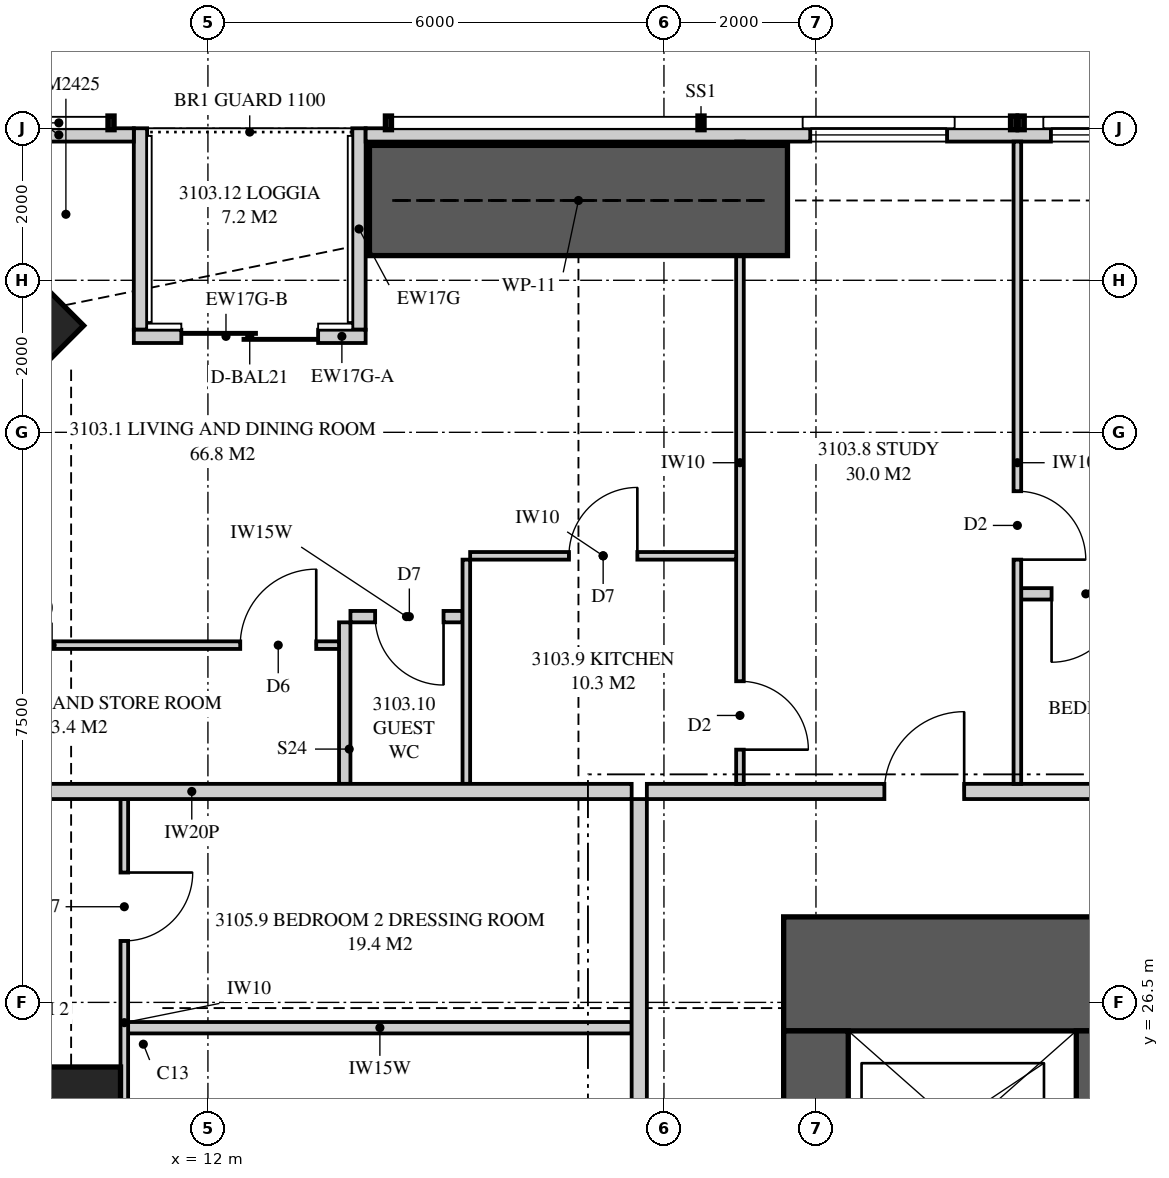
"""IFC4 building model, lengths in metres.
Left out: names, types, materials, properties, quantities, classifications, styles, units other than length and angle.
Written with IfcOpenShell. Run it as: python <this file> out.ifc"""

import sys

from ifc_helpers import new_model, si_unit, direction, frame, frame_2d, origin, origin_2d, place, context, subcontext, project, spatial, polyline, rectangle, outline, extrude, element, fill, save


model = new_model("IFC4")
c1 = context("Model", 3, precision=1e-05, world=origin(), true_north=direction((0.0, 1.0)))
c2 = subcontext(c1, "Body", "Model", "MODEL_VIEW")
j1 = project(units=[si_unit("LENGTHUNIT", "METRE"), si_unit("PLANEANGLEUNIT", "RADIAN")], contexts=[c1])
p1 = place(None, origin())
s1 = spatial("IfcSite", under=j1, at=p1, CompositionType="ELEMENT")
p2 = place(p1, origin())
s2 = spatial("IfcBuilding", under=s1, at=p2, CompositionType="ELEMENT")
p3 = place(p2, frame((0.0, 0.0, 114.9)))
s3 = spatial("IfcBuildingStorey", under=s2, at=p3, CompositionType="ELEMENT", Elevation=114.9)
p4 = place(p3, frame((8.631, 35.369, 0.0), z_axis=(0.0, 0.0, 1.0), x_axis=(0.707106781187, -0.707106781187, 0.0)))
e1 = element("IfcColumn", 1, at=p4, inside=s3, PredefinedType="COLUMN", context=c2, shape_type="SweptSolid", body=[
    extrude(rectangle(XDim=2.4, YDim=2.5, at=origin_2d()), origin(), (0.0, 0.0, 1.0), 3.35),
])
p5 = place(p3, frame((10.2, 25.0, 0.0), z_axis=(0.0, 0.0, 1.0), x_axis=(1.0, 0.0, 0.0)))
e2 = element("IfcColumn", 2, at=p5, inside=s3, PredefinedType="COLUMN", context=c2, shape_type="SweptSolid", body=[
    extrude(rectangle(XDim=1.3, YDim=1.3, at=origin_2d()), origin(), (0.0, 0.0, 1.0), 3.35),
])
p6 = place(p3, frame((26.0, 26.875, 0.0), z_axis=(0.0, 0.0, 1.0), x_axis=(-1.0, 0.0, 0.0)))
e3 = element("IfcWall", 3, at=p6, inside=s3, PredefinedType="SHEAR", context=c2, shape_type="SweptSolid", body=[
    extrude(rectangle(XDim=6.425, YDim=1.5, at=frame_2d((3.212, 0.0))), origin(), (0.0, 0.0, 1.0), 3.35),
])
p7 = place(p6, frame((0.825, 0.0, 0.0)))
e4 = element("IfcOpeningElement", 4, at=p7, cuts=e3, PredefinedType="OPENING", context=c2, shape_type="SweptSolid", body=[
    extrude(rectangle(XDim=0.75, YDim=2.1, at=frame_2d((0.375, 1.05))), frame((0.0, 0.76, 0.0), z_axis=(0.0, -1.0, 0.0), x_axis=(1.0, 0.0, 0.0)), (0.0, 0.0, 1.0), 1.52),
])
p8 = place(p3, frame((20.0, 26.125, 0.0), z_axis=(0.0, 0.0, 1.0), x_axis=(0.0, -1.0, 0.0)))
e5 = element("IfcWall", 5, at=p8, inside=s3, PredefinedType="SHEAR", context=c2, shape_type="SweptSolid", body=[
    extrude(rectangle(XDim=2.825, YDim=0.85, at=frame_2d((1.413, 0.0))), origin(), (0.0, 0.0, 1.0), 3.35),
])
p9 = place(p3, frame((23.6, 23.3, 0.0), z_axis=(0.0, 0.0, 1.0), x_axis=(0.0, 1.0, 0.0)))
e6 = element("IfcWall", 6, at=p9, inside=s3, PredefinedType="SHEAR", context=c2, shape_type="SweptSolid", body=[
    extrude(rectangle(XDim=2.825, YDim=0.35, at=frame_2d((1.413, 0.0))), origin(), (0.0, 0.0, 1.0), 3.35),
])
p10 = place(p3, frame((41.449, 37.913, 0.0), z_axis=(0.0, 0.0, 1.0), x_axis=(-1.0, 0.0, 0.0)))
e7 = element("IfcWall", 7, at=p10, inside=s3, PredefinedType="SOLIDWALL", context=c2, shape_type="SweptSolid", body=[
    extrude(outline(polyline([(0.0, 0.0), (27.374, 0.0), (27.374, 3.11), (24.777, 3.11), (24.777, 2.15), (24.732, 2.15), (24.732, 3.11), (24.574, 3.11), (24.574, 2.15), (2.824, 2.15), (2.824, 3.11), (2.666, 3.11), (2.666, 2.15), (2.62, 2.15), (2.62, 3.11), (0.0, 3.11), (0.0, 0.0)])), frame((0.0, 0.087, 0.0), z_axis=(0.0, -1.0, 0.0), x_axis=(1.0, 0.0, 0.0)), (0.0, 0.0, 1.0), 0.175),
])
p11 = place(p10, frame((5.699, 0.0, 0.4)))
e8 = element("IfcOpeningElement", 8, at=p11, cuts=e7, PredefinedType="OPENING", context=c2, shape_type="SweptSolid", body=[
    extrude(rectangle(XDim=1.8, YDim=1.7, at=frame_2d((0.9, 0.85))), frame((0.0, 0.097, 0.0), z_axis=(0.0, -1.0, 0.0), x_axis=(1.0, 0.0, 0.0)), (0.0, 0.0, 1.0), 0.195),
])
p12 = place(p10, frame((9.034, 0.0, 0.4)))
e9 = element("IfcOpeningElement", 9, at=p12, cuts=e7, PredefinedType="OPENING", context=c2, shape_type="SweptSolid", body=[
    extrude(rectangle(XDim=1.8, YDim=1.7, at=frame_2d((0.9, 0.85))), frame((0.0, 0.097, 0.0), z_axis=(0.0, -1.0, 0.0), x_axis=(1.0, 0.0, 0.0)), (0.0, 0.0, 1.0), 0.195),
])
p13 = place(p10, frame((16.558, 0.0, 0.4)))
e10 = element("IfcOpeningElement", 10, at=p13, cuts=e7, PredefinedType="OPENING", context=c2, shape_type="SweptSolid", body=[
    extrude(rectangle(XDim=1.8, YDim=1.7, at=frame_2d((0.9, 0.85))), frame((0.0, 0.097, 0.0), z_axis=(0.0, -1.0, 0.0), x_axis=(1.0, 0.0, 0.0)), (0.0, 0.0, 1.0), 0.195),
])
p14 = place(p10, frame((19.724, 0.0, 0.4)))
e11 = element("IfcOpeningElement", 11, at=p14, cuts=e7, PredefinedType="OPENING", context=c2, shape_type="SweptSolid", body=[
    extrude(rectangle(XDim=1.8, YDim=1.7, at=frame_2d((0.9, 0.85))), frame((0.0, 0.097, 0.0), z_axis=(0.0, -1.0, 0.0), x_axis=(1.0, 0.0, 0.0)), (0.0, 0.0, 1.0), 0.195),
])
p15 = place(p3, frame((11.025, 37.913, 0.0), z_axis=(0.0, 0.0, 1.0), x_axis=(-1.0, 0.0, 0.0)))
e12 = element("IfcWall", 12, at=p15, inside=s3, PredefinedType="SOLIDWALL", context=c2, shape_type="SweptSolid", body=[
    extrude(rectangle(XDim=1.974, YDim=0.175, at=frame_2d((0.987, 0.0))), origin(), (0.0, 0.0, 1.0), 3.11),
])
p16 = place(p3, frame((14.075, 35.262, 0.0), z_axis=(0.0, 0.0, 1.0), x_axis=(-1.0, 0.0, 0.0)))
e13 = element("IfcWall", 13, at=p16, inside=s3, PredefinedType="SOLIDWALL", context=c2, shape_type="SweptSolid", body=[
    extrude(rectangle(XDim=0.625, YDim=0.175, at=frame_2d((0.312, 0.0))), origin(), (0.0, 0.0, 1.0), 3.11),
])
p17 = place(p3, frame((13.45, 35.262, 0.0), z_axis=(0.0, 0.0, 1.0), x_axis=(-1.0, 0.0, 0.0)))
e14 = element("IfcWall", 14, at=p17, inside=s3, PredefinedType="SOLIDWALL", context=c2, shape_type="SweptSolid", body=[
    extrude(rectangle(XDim=2.425, YDim=0.175, at=frame_2d((1.212, 0.0))), origin(), (0.0, 0.0, 1.0), 2.15),
])
p18 = place(p17, origin())
e15 = element("IfcOpeningElement", 15, at=p18, cuts=e14, PredefinedType="OPENING", context=c2, shape_type="SweptSolid", body=[
    extrude(rectangle(XDim=1.8, YDim=2.1, at=frame_2d((0.9, 1.05))), frame((0.0, 0.097, 0.0), z_axis=(0.0, -1.0, 0.0), x_axis=(1.0, 0.0, 0.0)), (0.0, 0.0, 1.0), 0.195),
])
p19 = place(p3, frame((13.988, 38.0, 0.0), z_axis=(0.0, 0.0, 1.0), x_axis=(0.0, -1.0, 0.0)))
e16 = element("IfcWall", 16, at=p19, inside=s3, PredefinedType="SOLIDWALL", context=c2, shape_type="SweptSolid", body=[
    extrude(outline(polyline([(0.0, 0.0), (2.65, 0.0), (2.65, 3.11), (2.373, 3.11), (2.373, 2.15), (0.705, 2.15), (0.705, 3.11), (0.0, 3.11), (0.0, 0.0)])), frame((0.0, 0.087, 0.0), z_axis=(0.0, -1.0, 0.0), x_axis=(1.0, 0.0, 0.0)), (0.0, 0.0, 1.0), 0.175),
])
p20 = place(p3, frame((11.113, 38.0, 0.0), z_axis=(0.0, 0.0, 1.0), x_axis=(0.0, -1.0, 0.0)))
e17 = element("IfcWall", 17, at=p20, inside=s3, PredefinedType="SOLIDWALL", context=c2, shape_type="SweptSolid", body=[
    extrude(outline(polyline([(0.0, 0.0), (2.65, 0.0), (2.65, 2.15), (1.291, 2.15), (1.291, 3.11), (0.0, 3.11), (0.0, 0.0)])), frame((0.0, 0.087, 0.0), z_axis=(0.0, -1.0, 0.0), x_axis=(1.0, 0.0, 0.0)), (0.0, 0.0, 1.0), 0.175),
])
p21 = place(p3, frame((17.775, 29.275, 0.0), z_axis=(0.0, 0.0, 1.0), x_axis=(1.0, 0.0, 0.0)))
e18 = element("IfcWall", 18, at=p21, inside=s3, PredefinedType="PARTITIONING", context=c2, shape_type="SweptSolid", body=[
    extrude(outline(polyline([(0.0, 0.0), (18.925, 0.0), (18.925, 3.11), (10.312, 3.11), (10.312, 2.541), (9.638, 2.541), (9.638, 3.11), (0.0, 3.11), (0.0, 0.0)])), frame((0.0, 0.1, 0.0), z_axis=(0.0, -1.0, 0.0), x_axis=(1.0, 0.0, 0.0)), (0.0, 0.0, 1.0), 0.2),
])
p22 = place(p21, frame((3.125, 0.0, 0.0)))
e19 = element("IfcOpeningElement", 19, at=p22, cuts=e18, PredefinedType="OPENING", context=c2, shape_type="SweptSolid", body=[
    extrude(rectangle(XDim=1.05, YDim=2.2, at=frame_2d((0.525, 1.1))), frame((0.0, 0.11, 0.0), z_axis=(0.0, -1.0, 0.0), x_axis=(1.0, 0.0, 0.0)), (0.0, 0.0, 1.0), 0.22),
])
p23 = place(p3, frame((22.65, 37.825, 0.0), z_axis=(0.0, 0.0, 1.0), x_axis=(0.0, -1.0, 0.0)))
e20 = element("IfcWall", 20, at=p23, inside=s3, PredefinedType="PARTITIONING", context=c2, shape_type="SweptSolid", body=[
    extrude(outline(polyline([(0.0, 0.0), (8.45, 0.0), (8.45, 3.11), (1.635, 3.11), (1.635, 2.15), (0.0, 2.15), (0.0, 3.11), (0.0, 0.0)])), frame((0.0, 0.05, 0.0), z_axis=(0.0, -1.0, 0.0), x_axis=(1.0, 0.0, 0.0)), (0.0, 0.0, 1.0), 0.1),
])
p24 = place(p23, frame((4.6, 0.0, 0.0)))
e21 = element("IfcOpeningElement", 21, at=p24, cuts=e20, PredefinedType="OPENING", context=c2, shape_type="SweptSolid", body=[
    extrude(rectangle(XDim=0.9, YDim=2.1, at=frame_2d((0.45, 1.05))), frame((0.0, 0.06, 0.0), z_axis=(0.0, -1.0, 0.0), x_axis=(1.0, 0.0, 0.0)), (0.0, 0.0, 1.0), 0.12),
])
p25 = place(p3, frame((22.7, 31.875, 0.0), z_axis=(0.0, 0.0, 1.0), x_axis=(1.0, 0.0, 0.0)))
e22 = element("IfcWall", 22, at=p25, inside=s3, PredefinedType="PLUMBINGWALL", context=c2, shape_type="SweptSolid", body=[
    extrude(rectangle(XDim=4.15, YDim=0.15, at=frame_2d((2.075, 0.0))), origin(), (0.0, 0.0, 1.0), 3.11),
])
p26 = place(p25, frame((0.4, 0.0, 0.0)))
e23 = element("IfcOpeningElement", 23, at=p26, cuts=e22, PredefinedType="OPENING", context=c2, shape_type="SweptSolid", body=[
    extrude(rectangle(XDim=0.9, YDim=2.1, at=frame_2d((0.45, 1.05))), frame((0.0, 0.085, 0.0), z_axis=(0.0, -1.0, 0.0), x_axis=(1.0, 0.0, 0.0)), (0.0, 0.0, 1.0), 0.17),
])
p27 = place(p3, frame((19.0, 37.825, 0.0), z_axis=(0.0, 0.0, 1.0), x_axis=(0.0, -1.0, 0.0)))
e24 = element("IfcWall", 24, at=p27, inside=s3, PredefinedType="PARTITIONING", context=c2, shape_type="SweptSolid", body=[
    extrude(outline(polyline([(0.529, 2.15), (0.0, 2.15), (0.0, 0.0), (0.529, 0.0), (0.529, 0.017), (1.021, 0.017), (1.021, 0.0), (8.45, 0.0), (8.45, 3.11), (1.635, 3.11), (1.635, 2.15), (1.021, 2.15), (1.021, 2.133), (0.529, 2.133), (0.529, 2.15)])), frame((0.0, 0.05, 0.0), z_axis=(0.0, -1.0, 0.0), x_axis=(1.0, 0.0, 0.0)), (0.0, 0.0, 1.0), 0.1),
])
p28 = place(p27, frame((7.1, 0.0, 0.0)))
e25 = element("IfcOpeningElement", 25, at=p28, cuts=e24, PredefinedType="OPENING", context=c2, shape_type="SweptSolid", body=[
    extrude(rectangle(XDim=0.9, YDim=2.1, at=frame_2d((0.45, 1.05))), frame((0.0, 0.06, 0.0), z_axis=(0.0, -1.0, 0.0), x_axis=(1.0, 0.0, 0.0)), (0.0, 0.0, 1.0), 0.12),
])
p29 = place(p3, frame((15.45, 32.375, 0.0), z_axis=(0.0, 0.0, 1.0), x_axis=(1.0, 0.0, 0.0)))
e26 = element("IfcWall", 26, at=p29, inside=s3, PredefinedType="PARTITIONING", context=c2, shape_type="SweptSolid", body=[
    extrude(outline(polyline([(0.0, 0.0), (3.5, 0.0), (3.5, 3.11), (1.712, 3.11), (1.712, 2.541), (1.138, 2.541), (1.138, 3.11), (0.0, 3.11), (0.0, 0.0)])), frame((0.0, 0.05, 0.0), z_axis=(0.0, -1.0, 0.0), x_axis=(1.0, 0.0, 0.0)), (0.0, 0.0, 1.0), 0.1),
])
p30 = place(p29, frame((1.3, 0.0, 0.0)))
e27 = element("IfcOpeningElement", 27, at=p30, cuts=e26, PredefinedType="OPENING", context=c2, shape_type="SweptSolid", body=[
    extrude(rectangle(XDim=0.9, YDim=2.1, at=frame_2d((0.45, 1.05))), frame((0.0, 0.06, 0.0), z_axis=(0.0, -1.0, 0.0), x_axis=(1.0, 0.0, 0.0)), (0.0, 0.0, 1.0), 0.12),
])
p31 = place(p3, frame((15.4, 32.325, 0.0), z_axis=(0.0, 0.0, 1.0), x_axis=(0.0, -1.0, 0.0)))
e28 = element("IfcWall", 28, at=p31, inside=s3, PredefinedType="PARTITIONING", context=c2, shape_type="SweptSolid", body=[
    extrude(rectangle(XDim=2.95, YDim=0.1, at=frame_2d((1.475, 0.0))), origin(), (0.0, 0.0, 1.0), 3.11),
])
p32 = place(p3, frame((13.875, 31.575, 0.0), z_axis=(0.0, 0.0, 1.0), x_axis=(1.0, 0.0, 0.0)))
e29 = element("IfcWall", 29, at=p32, inside=s3, PredefinedType="PLUMBINGWALL", context=c2, shape_type="SweptSolid", body=[
    extrude(rectangle(XDim=1.475, YDim=0.15, at=frame_2d((0.738, 0.0))), origin(), (0.0, 0.0, 1.0), 3.11),
])
p33 = place(p32, frame((0.325, 0.0, 0.0)))
e30 = element("IfcOpeningElement", 30, at=p33, cuts=e29, PredefinedType="OPENING", context=c2, shape_type="SweptSolid", body=[
    extrude(rectangle(XDim=0.9, YDim=2.1, at=frame_2d((0.45, 1.05))), frame((0.0, 0.085, 0.0), z_axis=(0.0, -1.0, 0.0), x_axis=(1.0, 0.0, 0.0)), (0.0, 0.0, 1.0), 0.17),
])
p34 = place(p3, frame((13.8, 31.5, 0.0), z_axis=(0.0, 0.0, 1.0), x_axis=(0.0, -1.0, 0.0)))
e31 = element("IfcWall", 31, at=p34, inside=s3, PredefinedType="PLUMBINGWALL", context=c2, shape_type="SweptSolid", body=[
    extrude(rectangle(XDim=2.125, YDim=0.15, at=frame_2d((1.062, 0.0))), origin(), (0.0, 0.0, 1.0), 3.11),
])
p35 = place(p3, frame((6.175, 31.2, 0.0), z_axis=(0.0, 0.0, 1.0), x_axis=(1.0, 0.0, 0.0)))
e32 = element("IfcWall", 32, at=p35, inside=s3, PredefinedType="PARTITIONING", context=c2, shape_type="SweptSolid", body=[
    extrude(outline(polyline([(0.0, 0.0), (7.55, 0.0), (7.55, 3.11), (5.285, 3.11), (5.285, 2.51), (2.765, 2.51), (2.765, 3.11), (2.744, 3.11), (2.744, 2.541), (2.652, 2.541), (2.652, 2.15), (0.909, 2.15), (0.909, 3.11), (0.0, 3.11), (0.0, 0.0)])), frame((0.0, 0.05, 0.0), z_axis=(0.0, -1.0, 0.0), x_axis=(1.0, 0.0, 0.0)), (0.0, 0.0, 1.0), 0.1),
])
p36 = place(p35, frame((6.25, 0.0, 0.0)))
e33 = element("IfcOpeningElement", 33, at=p36, cuts=e32, PredefinedType="OPENING", context=c2, shape_type="SweptSolid", body=[
    extrude(rectangle(XDim=1.0, YDim=2.1, at=frame_2d((0.5, 1.05))), frame((0.0, 0.06, 0.0), z_axis=(0.0, -1.0, 0.0), x_axis=(1.0, 0.0, 0.0)), (0.0, 0.0, 1.0), 0.12),
])
p37 = place(p3, frame((6.0, 29.275, 0.0), z_axis=(0.0, 0.0, 1.0), x_axis=(1.0, 0.0, 0.0)))
e34 = element("IfcWall", 34, at=p37, inside=s3, PredefinedType="PARTITIONING", context=c2, shape_type="SweptSolid", body=[
    extrude(outline(polyline([(0.0, 0.0), (11.575, 0.0), (11.575, 3.11), (11.212, 3.11), (11.212, 2.541), (10.538, 2.541), (10.538, 3.11), (5.51, 3.11), (5.51, 2.51), (2.969, 2.51), (2.969, 2.541), (2.565, 2.541), (2.565, 2.15), (0.721, 2.15), (0.721, 3.11), (0.0, 3.11), (0.0, 0.0)])), frame((0.0, 0.1, 0.0), z_axis=(0.0, -1.0, 0.0), x_axis=(1.0, 0.0, 0.0)), (0.0, 0.0, 1.0), 0.2),
])
p38 = place(p3, frame((17.675, 19.7, 0.0), z_axis=(0.0, 0.0, 1.0), x_axis=(0.0, 1.0, 0.0)))
e35 = element("IfcWall", 35, at=p38, inside=s3, PredefinedType="PARTITIONING", context=c2, shape_type="SweptSolid", body=[
    extrude(outline(polyline([(0.0, 0.0), (9.475, 0.0), (9.475, 3.11), (7.062, 3.11), (7.062, 2.541), (6.388, 2.541), (6.388, 3.11), (0.0, 3.11), (0.0, 0.0)])), frame((0.0, 0.1, 0.0), z_axis=(0.0, -1.0, 0.0), x_axis=(1.0, 0.0, 0.0)), (0.0, 0.0, 1.0), 0.2),
])
p39 = place(p3, frame((10.9, 23.292, 0.0), z_axis=(0.0, 0.0, 1.0), x_axis=(0.0, 1.0, 0.0)))
e36 = element("IfcWall", 36, at=p39, inside=s3, PredefinedType="PARTITIONING", context=c2, shape_type="SweptSolid", body=[
    extrude(outline(polyline([(0.0, 0.0), (5.883, 0.0), (5.883, 3.11), (5.883, 2.51), (1.768, 2.51), (0.0, 2.51), (0.0, 3.11), (0.0, 0.0)])), frame((0.0, 0.05, 0.0), z_axis=(0.0, -1.0, 0.0), x_axis=(1.0, 0.0, 0.0)), (0.0, 0.0, 1.0), 0.1),
])
p40 = place(p39, frame((0.15, 0.0, 0.0)))
e37 = element("IfcOpeningElement", 37, at=p40, cuts=e36, PredefinedType="OPENING", context=c2, shape_type="SweptSolid", body=[
    extrude(rectangle(XDim=0.9, YDim=2.1, at=frame_2d((0.45, 1.05))), frame((0.0, 0.06, 0.0), z_axis=(0.0, -1.0, 0.0), x_axis=(1.0, 0.0, 0.0)), (0.0, 0.0, 1.0), 0.12),
])
p41 = place(p39, frame((4.017, 0.0, 0.0)))
e38 = element("IfcOpeningElement", 38, at=p41, cuts=e36, PredefinedType="OPENING", context=c2, shape_type="SweptSolid", body=[
    extrude(rectangle(XDim=0.9, YDim=2.1, at=frame_2d((0.45, 1.05))), frame((0.0, 0.06, 0.0), z_axis=(0.0, -1.0, 0.0), x_axis=(1.0, 0.0, 0.0)), (0.0, 0.0, 1.0), 0.12),
])
p42 = place(p3, frame((10.95, 26.167, 0.0), z_axis=(0.0, 0.0, 1.0), x_axis=(1.0, 0.0, 0.0)))
e39 = element("IfcWall", 39, at=p42, inside=s3, PredefinedType="PLUMBINGWALL", context=c2, shape_type="SweptSolid", body=[
    extrude(outline(polyline([(0.0, 0.0), (6.625, 0.0), (6.625, 3.11), (6.625, 2.541), (0.535, 2.541), (0.535, 2.51), (0.0, 2.51), (0.0, 3.11), (0.0, 0.0)])), frame((0.0, 0.075, 0.0), z_axis=(0.0, -1.0, 0.0), x_axis=(1.0, 0.0, 0.0)), (0.0, 0.0, 1.0), 0.15),
])
p43 = place(p3, frame((14.125, 37.05, 0.0), z_axis=(0.0, 0.0, 1.0), x_axis=(1.0, 0.0, 0.0)))
e40 = element("IfcWall", 40, at=p43, inside=s3, PredefinedType="SHEAR", context=c2, shape_type="SweptSolid", body=[
    extrude(rectangle(XDim=5.5, YDim=1.45, at=frame_2d((2.75, 0.0))), origin(), (0.0, 0.0, 1.0), 3.35),
])
p44 = place(p13, origin())
e41 = element("IfcWindow", 41, at=p44, inside=s3, PartitioningType="SINGLE_PANEL", PredefinedType="WINDOW", context=c2, shape_type="SweptSolid", body=[
    extrude(rectangle(XDim=1.8, YDim=1.7, at=frame_2d((0.9, 0.85))), frame((0.0, 0.03, 0.0), z_axis=(0.0, -1.0, 0.0), x_axis=(1.0, 0.0, 0.0)), (0.0, 0.0, 1.0), 0.06),
])
fill(e10, e41)
p45 = place(p14, origin())
e42 = element("IfcWindow", 42, at=p45, inside=s3, PartitioningType="SINGLE_PANEL", PredefinedType="WINDOW", context=c2, shape_type="SweptSolid", body=[
    extrude(rectangle(XDim=1.8, YDim=1.7, at=frame_2d((0.9, 0.85))), frame((0.0, 0.03, 0.0), z_axis=(0.0, -1.0, 0.0), x_axis=(1.0, 0.0, 0.0)), (0.0, 0.0, 1.0), 0.06),
])
fill(e11, e42)
p46 = place(p18, origin())
e43 = element("IfcDoor", 43, at=p46, inside=s3, OperationType="SLIDING_TO_LEFT", PredefinedType="DOOR", context=c2, shape_type="SweptSolid", body=[
    extrude(rectangle(XDim=1.8, YDim=2.1, at=frame_2d((0.9, 1.05))), frame((0.0, 0.025, 0.0), z_axis=(0.0, -1.0, 0.0), x_axis=(1.0, 0.0, 0.0)), (0.0, 0.0, 1.0), 0.05),
])
fill(e15, e43)
p47 = place(p22, origin())
e44 = element("IfcDoor", 44, at=p47, inside=s3, OperationType="SINGLE_SWING_RIGHT", PredefinedType="DOOR", context=c2, shape_type="SweptSolid", body=[
    extrude(rectangle(XDim=1.05, YDim=2.2, at=frame_2d((0.525, 1.1))), frame((0.0, 0.025, 0.0), z_axis=(0.0, -1.0, 0.0), x_axis=(1.0, 0.0, 0.0)), (0.0, 0.0, 1.0), 0.05),
])
fill(e19, e44)
p48 = place(p24, origin())
e45 = element("IfcDoor", 45, at=p48, inside=s3, OperationType="SINGLE_SWING_RIGHT", PredefinedType="DOOR", context=c2, shape_type="SweptSolid", body=[
    extrude(rectangle(XDim=0.9, YDim=2.1, at=frame_2d((0.45, 1.05))), frame((0.0, 0.025, 0.0), z_axis=(0.0, -1.0, 0.0), x_axis=(1.0, 0.0, 0.0)), (0.0, 0.0, 1.0), 0.05),
])
fill(e21, e45)
p49 = place(p26, frame((0.9, 0.0, 0.0), z_axis=(0.0, 0.0, 1.0), x_axis=(-1.0, 0.0, 0.0)))
e46 = element("IfcDoor", 46, at=p49, inside=s3, OperationType="SINGLE_SWING_RIGHT", PredefinedType="DOOR", context=c2, shape_type="SweptSolid", body=[
    extrude(rectangle(XDim=0.9, YDim=2.1, at=frame_2d((0.45, 1.05))), frame((0.0, 0.025, 0.0), z_axis=(0.0, -1.0, 0.0), x_axis=(1.0, 0.0, 0.0)), (0.0, 0.0, 1.0), 0.05),
])
fill(e23, e46)
p50 = place(p28, origin())
e47 = element("IfcDoor", 47, at=p50, inside=s3, OperationType="SINGLE_SWING_RIGHT", PredefinedType="DOOR", context=c2, shape_type="SweptSolid", body=[
    extrude(rectangle(XDim=0.9, YDim=2.1, at=frame_2d((0.45, 1.05))), frame((0.0, 0.025, 0.0), z_axis=(0.0, -1.0, 0.0), x_axis=(1.0, 0.0, 0.0)), (0.0, 0.0, 1.0), 0.05),
])
fill(e25, e47)
p51 = place(p30, origin())
e48 = element("IfcDoor", 48, at=p51, inside=s3, OperationType="SINGLE_SWING_RIGHT", PredefinedType="DOOR", context=c2, shape_type="SweptSolid", body=[
    extrude(rectangle(XDim=0.9, YDim=2.1, at=frame_2d((0.45, 1.05))), frame((0.0, 0.025, 0.0), z_axis=(0.0, -1.0, 0.0), x_axis=(1.0, 0.0, 0.0)), (0.0, 0.0, 1.0), 0.05),
])
fill(e27, e48)
p52 = place(p33, frame((0.9, 0.0, 0.0), z_axis=(0.0, 0.0, 1.0), x_axis=(-1.0, 0.0, 0.0)))
e49 = element("IfcDoor", 49, at=p52, inside=s3, OperationType="SINGLE_SWING_LEFT", PredefinedType="DOOR", context=c2, shape_type="SweptSolid", body=[
    extrude(rectangle(XDim=0.9, YDim=2.1, at=frame_2d((0.45, 1.05))), frame((0.0, 0.025, 0.0), z_axis=(0.0, -1.0, 0.0), x_axis=(1.0, 0.0, 0.0)), (0.0, 0.0, 1.0), 0.05),
])
fill(e30, e49)
p53 = place(p36, origin())
e50 = element("IfcDoor", 50, at=p53, inside=s3, OperationType="SINGLE_SWING_RIGHT", PredefinedType="DOOR", context=c2, shape_type="SweptSolid", body=[
    extrude(rectangle(XDim=1.0, YDim=2.1, at=frame_2d((0.5, 1.05))), frame((0.0, 0.025, 0.0), z_axis=(0.0, -1.0, 0.0), x_axis=(1.0, 0.0, 0.0)), (0.0, 0.0, 1.0), 0.05),
])
fill(e33, e50)
p54 = place(p41, frame((0.9, 0.0, 0.0), z_axis=(0.0, 0.0, 1.0), x_axis=(-1.0, 0.0, 0.0)))
e51 = element("IfcDoor", 51, at=p54, inside=s3, OperationType="SINGLE_SWING_LEFT", PredefinedType="DOOR", context=c2, shape_type="SweptSolid", body=[
    extrude(rectangle(XDim=0.9, YDim=2.1, at=frame_2d((0.45, 1.05))), frame((0.0, 0.025, 0.0), z_axis=(0.0, -1.0, 0.0), x_axis=(1.0, 0.0, 0.0)), (0.0, 0.0, 1.0), 0.05),
])
fill(e38, e51)
save(model, sys.argv[1])
